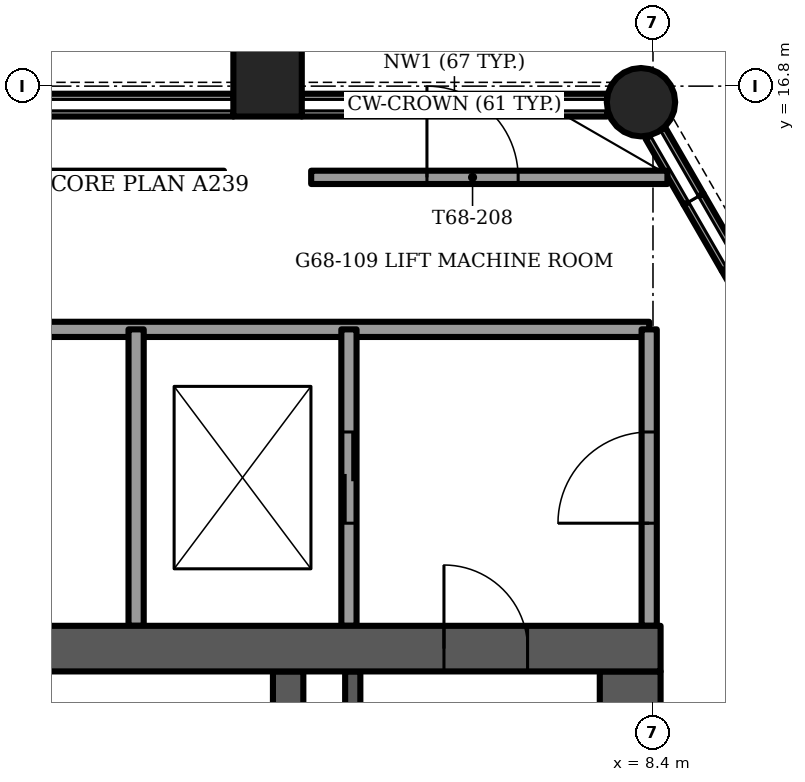
"""IFC4 building model, lengths in metres.
Left out: names, types, materials, properties, quantities, classifications, styles, units other than length and angle.
Written with IfcOpenShell. Run it as: python <this file> out.ifc"""

import sys

from ifc_helpers import new_model, si_unit, direction, frame, frame_2d, origin, origin_2d, place, context, subcontext, project, spatial, rectangle, circle, extrude, element, fill, save


model = new_model("IFC4")
c1 = context("Model", 3, precision=1e-05, world=origin(), true_north=direction((0.0, 1.0)))
c2 = subcontext(c1, "Body", "Model", "MODEL_VIEW")
j1 = project(units=[si_unit("LENGTHUNIT", "METRE"), si_unit("PLANEANGLEUNIT", "RADIAN")], contexts=[c1])
p1 = place(None, origin())
s1 = spatial("IfcSite", under=j1, at=p1, CompositionType="ELEMENT")
p2 = place(p1, origin())
s2 = spatial("IfcBuilding", under=s1, at=p2, CompositionType="ELEMENT")
p3 = place(p2, frame((0.0, 0.0, 275.0)))
s3 = spatial("IfcBuildingStorey", under=s2, at=p3, CompositionType="ELEMENT", Elevation=275.0)
p4 = place(p3, frame((-8.5, 9.4, -0.3), z_axis=(0.0, 0.0, 1.0), x_axis=(1.0, 0.0, 0.0)))
e1 = element("IfcWall", 1, at=p4, inside=s3, PredefinedType="SHEAR", context=c2, shape_type="SweptSolid", body=[
    extrude(rectangle(XDim=17.0, YDim=0.6, at=frame_2d((8.5, 0.0))), origin(), (0.0, 0.0, 1.0), 4.5),
])
p5 = place(p4, frame((1.75, 0.0, 0.0)))
e2 = element("IfcOpeningElement", 2, at=p5, cuts=e1, PredefinedType="OPENING", context=c2, shape_type="SweptSolid", body=[
    extrude(rectangle(XDim=1.1, YDim=2.1, at=frame_2d((0.55, 1.05))), frame((0.0, 0.3, 0.0), z_axis=(0.0, -1.0, 0.0), x_axis=(1.0, 0.0, 0.0)), (0.0, 0.0, 1.0), 0.6),
])
p6 = place(p4, frame((14.15, 0.0, 0.0)))
e3 = element("IfcOpeningElement", 3, at=p6, cuts=e1, PredefinedType="OPENING", context=c2, shape_type="SweptSolid", body=[
    extrude(rectangle(XDim=1.1, YDim=2.1, at=frame_2d((0.55, 1.05))), frame((0.0, 0.3, 0.0), z_axis=(0.0, -1.0, 0.0), x_axis=(1.0, 0.0, 0.0)), (0.0, 0.0, 1.0), 0.6),
])
p7 = place(p3, frame((8.1, -1.1, -0.3), z_axis=(0.0, 0.0, 1.0), x_axis=(0.0, 1.0, 0.0)))
e4 = element("IfcWall", 4, at=p7, inside=s3, PredefinedType="SHEAR", context=c2, shape_type="SweptSolid", body=[
    extrude(rectangle(XDim=10.2, YDim=0.8, at=frame_2d((5.1, 0.0))), origin(), (0.0, 0.0, 1.0), 4.5),
])
p8 = place(p7, frame((8.35, 0.0, 0.0)))
e5 = element("IfcOpeningElement", 5, at=p8, cuts=e4, PredefinedType="OPENING", context=c2, shape_type="SweptSolid", body=[
    extrude(rectangle(XDim=1.1, YDim=2.1, at=frame_2d((0.55, 1.05))), frame((0.0, 0.4, 0.0), z_axis=(0.0, -1.0, 0.0), x_axis=(1.0, 0.0, 0.0)), (0.0, 0.0, 1.0), 0.8),
])
p9 = place(p3, frame((3.6, -1.1, -0.3), z_axis=(0.0, 0.0, 1.0), x_axis=(0.0, 1.0, 0.0)))
e6 = element("IfcWall", 6, at=p9, inside=s3, PredefinedType="SHEAR", context=c2, shape_type="SweptSolid", body=[
    extrude(rectangle(XDim=10.2, YDim=0.4, at=frame_2d((5.1, 0.0))), origin(), (0.0, 0.0, 1.0), 4.5),
])
p10 = place(p3, frame((8.242, 16.589, -1.2), z_axis=(0.0, 0.0, 1.0), x_axis=(1.0, 0.0, 0.0)))
e7 = element("IfcColumn", 7, at=p10, inside=s3, PredefinedType="COLUMN", context=c2, shape_type="SweptSolid", body=[
    extrude(circle(Radius=0.45, at=origin_2d()), origin(), (0.0, 0.0, 1.0), 4.5),
])
p11 = place(p3, frame((3.329, 16.85, -1.2), z_axis=(0.0, 0.0, 1.0), x_axis=(1.0, 0.0, 0.0)))
e8 = element("IfcColumn", 8, at=p11, inside=s3, PredefinedType="COLUMN", context=c2, shape_type="SweptSolid", body=[
    extrude(rectangle(XDim=0.9, YDim=0.9, at=origin_2d()), origin(), (0.0, 0.0, 1.0), 4.5),
])
p12 = place(p3, frame((7.796, 16.55, 0.0), z_axis=(0.0, 0.0, 1.0), x_axis=(-1.0, 0.0, 0.0)))
e9 = element("IfcWall", 9, at=p12, inside=s3, PredefinedType="SOLIDWALL", context=c2, shape_type="SweptSolid", body=[
    extrude(rectangle(XDim=4.017, YDim=0.3, at=frame_2d((2.008, 0.0))), origin(), (0.0, 0.0, 1.0), 1.0),
])
p13 = place(p3, frame((2.879, 16.55, 0.0), z_axis=(0.0, 0.0, 1.0), x_axis=(-1.0, 0.0, 0.0)))
e10 = element("IfcWall", 10, at=p13, inside=s3, PredefinedType="SOLIDWALL", context=c2, shape_type="SweptSolid", body=[
    extrude(rectangle(XDim=5.759, YDim=0.3, at=frame_2d((2.879, 0.0))), origin(), (0.0, 0.0, 1.0), 1.0),
])
p14 = place(p3, frame((9.937, 13.576, 0.0), z_axis=(0.0, 0.0, 1.0), x_axis=(-0.499961250474, 0.866047774678, 0.0)))
e11 = element("IfcWall", 11, at=p14, inside=s3, PredefinedType="SOLIDWALL", context=c2, shape_type="SweptSolid", body=[
    extrude(rectangle(XDim=1.003, YDim=0.3, at=frame_2d((0.501, 0.0))), origin(), (0.0, 0.0, 1.0), 1.0),
])
p15 = place(p3, frame((9.435, 14.445, 0.0), z_axis=(0.0, 0.0, 1.0), x_axis=(-0.500038395149, 0.8660032352, 0.0)))
e12 = element("IfcWall", 12, at=p15, inside=s3, PredefinedType="SOLIDWALL", context=c2, shape_type="SweptSolid", body=[
    extrude(rectangle(XDim=1.003, YDim=0.3, at=frame_2d((0.502, 0.0))), origin(), (0.0, 0.0, 1.0), 1.0),
])
p16 = place(p3, frame((8.934, 15.314, 0.0), z_axis=(0.0, 0.0, 1.0), x_axis=(-0.500143783026, 0.865942374699, 0.0)))
e13 = element("IfcWall", 13, at=p16, inside=s3, PredefinedType="SOLIDWALL", context=c2, shape_type="SweptSolid", body=[
    extrude(rectangle(XDim=1.003, YDim=0.3, at=frame_2d((0.501, 0.0))), origin(), (0.0, 0.0, 1.0), 1.0),
])
p17 = place(p3, frame((-2.756, 15.6, 0.0), z_axis=(0.0, 0.0, 1.0), x_axis=(1.0, 0.0, 0.0)))
e14 = element("IfcWall", 14, at=p17, inside=s3, PredefinedType="PARTITIONING", context=c2, shape_type="SweptSolid", body=[
    extrude(rectangle(XDim=5.512, YDim=0.175, at=frame_2d((2.756, 0.0))), origin(), (0.0, 0.0, 1.0), 4.2),
])
p18 = place(p3, frame((3.903, 15.6, 0.0), z_axis=(0.0, 0.0, 1.0), x_axis=(1.0, 0.0, 0.0)))
e15 = element("IfcWall", 15, at=p18, inside=s3, PredefinedType="PARTITIONING", context=c2, shape_type="SweptSolid", body=[
    extrude(rectangle(XDim=4.687, YDim=0.175, at=frame_2d((2.344, 0.0))), origin(), (0.0, 0.0, 1.0), 4.2),
])
p19 = place(p18, frame((1.523, 0.0, 0.0)))
e16 = element("IfcOpeningElement", 16, at=p19, cuts=e15, PredefinedType="OPENING", context=c2, shape_type="SweptSolid", body=[
    extrude(rectangle(XDim=1.2, YDim=2.1, at=frame_2d((0.6, 1.05))), frame((0.0, 0.087, 0.0), z_axis=(0.0, -1.0, 0.0), x_axis=(1.0, 0.0, 0.0)), (0.0, 0.0, 1.0), 0.175),
])
p20 = place(p3, frame((4.45, 0.9, -0.3), z_axis=(0.0, 0.0, 1.0), x_axis=(0.0, 1.0, 0.0)))
e17 = element("IfcWall", 17, at=p20, inside=s3, PredefinedType="SOLIDWALL", context=c2, shape_type="SweptSolid", body=[
    extrude(rectangle(XDim=8.2, YDim=0.2, at=frame_2d((4.1, 0.0))), origin(), (0.0, 0.0, 1.0), 4.5),
])
p21 = place(p3, frame((-8.35, 13.6, 0.0), z_axis=(0.0, 0.0, 1.0), x_axis=(1.0, 0.0, 0.0)))
e18 = element("IfcWall", 18, at=p21, inside=s3, PredefinedType="PARTITIONING", context=c2, shape_type="SweptSolid", body=[
    extrude(rectangle(XDim=16.7, YDim=0.2, at=frame_2d((8.35, 0.0))), origin(), (0.0, 0.0, 1.0), 4.2),
])
p22 = place(p3, frame((8.35, 9.7, 0.0), z_axis=(0.0, 0.0, 1.0), x_axis=(0.0, 1.0, 0.0)))
e19 = element("IfcWall", 19, at=p22, inside=s3, PredefinedType="PARTITIONING", context=c2, shape_type="SweptSolid", body=[
    extrude(rectangle(XDim=3.9, YDim=0.2, at=frame_2d((1.95, 0.0))), origin(), (0.0, 0.0, 1.0), 4.2),
])
p23 = place(p22, frame((1.35, 0.0, 0.0)))
e20 = element("IfcOpeningElement", 20, at=p23, cuts=e19, PredefinedType="OPENING", context=c2, shape_type="SweptSolid", body=[
    extrude(rectangle(XDim=1.2, YDim=2.1, at=frame_2d((0.6, 1.05))), frame((0.0, 0.1, 0.0), z_axis=(0.0, -1.0, 0.0), x_axis=(1.0, 0.0, 0.0)), (0.0, 0.0, 1.0), 0.2),
])
p24 = place(p3, frame((4.4, 9.7, 0.0), z_axis=(0.0, 0.0, 1.0), x_axis=(0.0, 1.0, 0.0)))
e21 = element("IfcWall", 21, at=p24, inside=s3, PredefinedType="PARTITIONING", context=c2, shape_type="SweptSolid", body=[
    extrude(rectangle(XDim=3.9, YDim=0.2, at=frame_2d((1.95, 0.0))), origin(), (0.0, 0.0, 1.0), 4.2),
])
p25 = place(p24, frame((1.35, 0.0, 0.0)))
e22 = element("IfcOpeningElement", 22, at=p25, cuts=e21, PredefinedType="OPENING", context=c2, shape_type="SweptSolid", body=[
    extrude(rectangle(XDim=1.2, YDim=2.1, at=frame_2d((0.6, 1.05))), frame((0.0, 0.1, 0.0), z_axis=(0.0, -1.0, 0.0), x_axis=(1.0, 0.0, 0.0)), (0.0, 0.0, 1.0), 0.2),
])
p26 = place(p3, frame((1.6, 9.7, 0.0), z_axis=(0.0, 0.0, 1.0), x_axis=(0.0, 1.0, 0.0)))
e23 = element("IfcWall", 23, at=p26, inside=s3, PredefinedType="PARTITIONING", context=c2, shape_type="SweptSolid", body=[
    extrude(rectangle(XDim=3.9, YDim=0.2, at=frame_2d((1.95, 0.0))), origin(), (0.0, 0.0, 1.0), 4.2),
])
p27 = place(p19, origin())
e24 = element("IfcDoor", 24, at=p27, inside=s3, OperationType="SINGLE_SWING_RIGHT", PredefinedType="DOOR", context=c2, shape_type="SweptSolid", body=[
    extrude(rectangle(XDim=1.2, YDim=2.1, at=frame_2d((0.6, 1.05))), frame((0.0, 0.025, 0.0), z_axis=(0.0, -1.0, 0.0), x_axis=(1.0, 0.0, 0.0)), (0.0, 0.0, 1.0), 0.05),
])
fill(e16, e24)
p28 = place(p6, origin())
e25 = element("IfcDoor", 25, at=p28, inside=s3, OperationType="SINGLE_SWING_RIGHT", PredefinedType="DOOR", context=c2, shape_type="SweptSolid", body=[
    extrude(rectangle(XDim=1.1, YDim=2.1, at=frame_2d((0.55, 1.05))), frame((0.0, 0.025, 0.0), z_axis=(0.0, -1.0, 0.0), x_axis=(1.0, 0.0, 0.0)), (0.0, 0.0, 1.0), 0.05),
])
fill(e3, e25)
p29 = place(p25, origin())
e26 = element("IfcDoor", 26, at=p29, inside=s3, OperationType="SLIDING_TO_LEFT", PredefinedType="DOOR", context=c2, shape_type="SweptSolid", body=[
    extrude(rectangle(XDim=1.2, YDim=2.1, at=frame_2d((0.6, 1.05))), frame((0.0, 0.025, 0.0), z_axis=(0.0, -1.0, 0.0), x_axis=(1.0, 0.0, 0.0)), (0.0, 0.0, 1.0), 0.05),
])
fill(e22, e26)
p30 = place(p23, origin())
e27 = element("IfcDoor", 27, at=p30, inside=s3, OperationType="SINGLE_SWING_LEFT", PredefinedType="DOOR", context=c2, shape_type="SweptSolid", body=[
    extrude(rectangle(XDim=1.2, YDim=2.1, at=frame_2d((0.6, 1.05))), frame((0.0, 0.025, 0.0), z_axis=(0.0, -1.0, 0.0), x_axis=(1.0, 0.0, 0.0)), (0.0, 0.0, 1.0), 0.05),
])
fill(e20, e27)
save(model, sys.argv[1])
